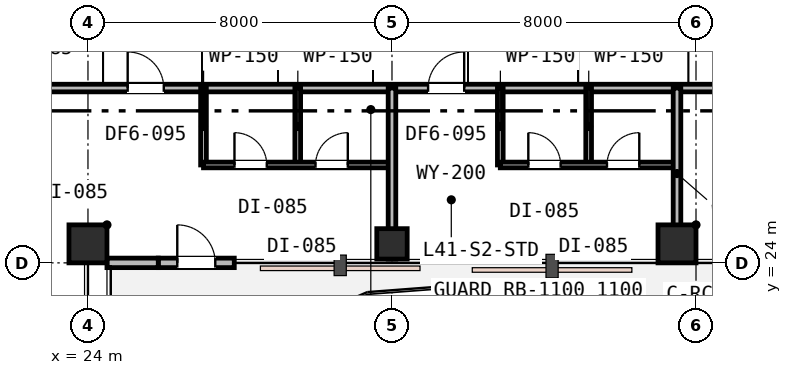
"""IFC4 building model, lengths in metres.
Left out: names, types, materials, properties, quantities, classifications, styles, units other than length and angle.
Written with IfcOpenShell. Run it as: python <this file> out.ifc"""

import sys

from ifc_helpers import new_model, si_unit, direction, frame, frame_2d, origin, origin_2d, place, context, subcontext, project, spatial, rectangle, extrude, element, fill, save


model = new_model("IFC4")
c1 = context("Model", 3, precision=1e-05, world=origin(), true_north=direction((0.0, 1.0)))
c2 = subcontext(c1, "Body", "Model", "MODEL_VIEW")
j1 = project(units=[si_unit("LENGTHUNIT", "METRE"), si_unit("PLANEANGLEUNIT", "RADIAN")], contexts=[c1])
p1 = place(None, origin())
s1 = spatial("IfcSite", under=j1, at=p1, CompositionType="ELEMENT")
p2 = place(p1, origin())
s2 = spatial("IfcBuilding", under=s1, at=p2, CompositionType="ELEMENT")
p3 = place(p2, frame((0.0, 0.0, 161.4)))
s3 = spatial("IfcBuildingStorey", under=s2, at=p3, CompositionType="ELEMENT", Elevation=161.4)
p4 = place(p3, frame((24.0, 24.5, 0.0), z_axis=(0.0, 0.0, 1.0), x_axis=(1.0, 0.0, 0.0)))
e1 = element("IfcColumn", 1, at=p4, inside=s3, PredefinedType="COLUMN", context=c2, shape_type="SweptSolid", body=[
    extrude(rectangle(XDim=1.0, YDim=1.0, at=origin_2d()), origin(), (0.0, 0.0, 1.0), 3.6),
])
p5 = place(p3, frame((32.0, 24.5, 0.0), z_axis=(0.0, 0.0, 1.0), x_axis=(1.0, 0.0, 0.0)))
e2 = element("IfcColumn", 2, at=p5, inside=s3, PredefinedType="COLUMN", context=c2, shape_type="SweptSolid", body=[
    extrude(rectangle(XDim=0.8, YDim=0.8, at=origin_2d()), origin(), (0.0, 0.0, 1.0), 3.6),
])
p6 = place(p3, frame((39.5, 24.5, 0.0), z_axis=(0.0, 0.0, 1.0), x_axis=(1.0, 0.0, 0.0)))
e3 = element("IfcColumn", 3, at=p6, inside=s3, PredefinedType="COLUMN", context=c2, shape_type="SweptSolid", body=[
    extrude(rectangle(XDim=1.0, YDim=1.0, at=origin_2d()), origin(), (0.0, 0.0, 1.0), 3.6),
])
p7 = place(p3, frame((25.85, 24.0, 0.0), z_axis=(0.0, 0.0, 1.0), x_axis=(1.0, 0.0, 0.0)))
e4 = element("IfcWall", 4, at=p7, inside=s3, PredefinedType="STANDARD", context=c2, shape_type="SweptSolid", body=[
    extrude(rectangle(XDim=2.0, YDim=0.25, at=frame_2d((1.0, 0.0))), origin(), (0.0, 0.0, 1.0), 3.01),
])
p8 = place(p7, frame((0.5, 0.0, 0.0)))
e5 = element("IfcOpeningElement", 5, at=p8, cuts=e4, PredefinedType="OPENING", context=c2, shape_type="SweptSolid", body=[
    extrude(rectangle(XDim=1.0, YDim=2.15, at=frame_2d((0.5, 1.075))), frame((0.0, 0.135, 0.0), z_axis=(0.0, -1.0, 0.0), x_axis=(1.0, 0.0, 0.0)), (0.0, 0.0, 1.0), 0.27),
])
p9 = place(p3, frame((24.5, 24.0, 0.0), z_axis=(0.0, 0.0, 1.0), x_axis=(1.0, 0.0, 0.0)))
e6 = element("IfcWall", 6, at=p9, inside=s3, PredefinedType="STANDARD", context=c2, shape_type="SweptSolid", body=[
    extrude(rectangle(XDim=1.35, YDim=0.25, at=frame_2d((0.675, 0.0))), origin(), (0.0, 0.0, 1.0), 3.01),
])
p10 = place(p3, frame((19.6, 28.6, 0.0), z_axis=(0.0, 0.0, 1.0), x_axis=(1.0, 0.0, 0.0)))
e7 = element("IfcWall", 7, at=p10, inside=s3, PredefinedType="PARTITIONING", context=c2, shape_type="SweptSolid", body=[
    extrude(rectangle(XDim=31.3, YDim=0.2, at=frame_2d((15.65, 0.0))), origin(), (0.0, 0.0, 1.0), 2.93),
])
p11 = place(p10, frame((5.445, 0.0, 0.0)))
e8 = element("IfcOpeningElement", 8, at=p11, cuts=e7, PredefinedType="OPENING", context=c2, shape_type="SweptSolid", body=[
    extrude(rectangle(XDim=0.95, YDim=2.15, at=frame_2d((0.475, 1.075))), frame((0.0, 0.11, 0.0), z_axis=(0.0, -1.0, 0.0), x_axis=(1.0, 0.0, 0.0)), (0.0, 0.0, 1.0), 0.22),
])
p12 = place(p10, frame((13.35, 0.0, 0.0)))
e9 = element("IfcOpeningElement", 9, at=p12, cuts=e7, PredefinedType="OPENING", context=c2, shape_type="SweptSolid", body=[
    extrude(rectangle(XDim=0.95, YDim=2.15, at=frame_2d((0.475, 1.075))), frame((0.0, 0.11, 0.0), z_axis=(0.0, -1.0, 0.0), x_axis=(1.0, 0.0, 0.0)), (0.0, 0.0, 1.0), 0.22),
])
p13 = place(p10, frame((21.925, 0.0, 0.0)))
e10 = element("IfcOpeningElement", 10, at=p13, cuts=e7, PredefinedType="OPENING", context=c2, shape_type="SweptSolid", body=[
    extrude(rectangle(XDim=0.95, YDim=2.15, at=frame_2d((0.475, 1.075))), frame((0.0, 0.11, 0.0), z_axis=(0.0, -1.0, 0.0), x_axis=(1.0, 0.0, 0.0)), (0.0, 0.0, 1.0), 0.22),
])
for number, where, z_axis, x_axis in (
    (11, (27.04, 26.576, 0.0), (0.0, 0.0, 1.0), (0.0, 1.0, 0.0)),
    (12, (29.52, 26.576, 0.0), (0.0, 0.0, 1.0), (0.0, 1.0, 0.0)),
):
    element("IfcWall", number, at=place(p3, frame(where, z_axis=z_axis, x_axis=x_axis)), inside=s3, PredefinedType="PARTITIONING", context=c2, shape_type="SweptSolid", body=[
        extrude(rectangle(XDim=2.024, YDim=0.15, at=frame_2d((1.012, 0.0))), origin(), (0.0, 0.0, 1.0), 2.96),
    ])
p14 = place(p3, frame((27.04, 26.576, 0.0), z_axis=(0.0, 0.0, 1.0), x_axis=(1.0, 0.0, 0.0)))
e13 = element("IfcWall", 13, at=p14, inside=s3, PredefinedType="PARTITIONING", context=c2, shape_type="SweptSolid", body=[
    extrude(rectangle(XDim=4.96, YDim=0.15, at=frame_2d((2.48, 0.0))), origin(), (0.0, 0.0, 1.0), 2.93),
])
p15 = place(p14, frame((0.815, 0.0, 0.0)))
e14 = element("IfcOpeningElement", 14, at=p15, cuts=e13, PredefinedType="OPENING", context=c2, shape_type="SweptSolid", body=[
    extrude(rectangle(XDim=0.85, YDim=2.15, at=frame_2d((0.425, 1.075))), frame((0.0, 0.085, 0.0), z_axis=(0.0, -1.0, 0.0), x_axis=(1.0, 0.0, 0.0)), (0.0, 0.0, 1.0), 0.17),
])
p16 = place(p14, frame((2.947, 0.0, 0.0)))
e15 = element("IfcOpeningElement", 15, at=p16, cuts=e13, PredefinedType="OPENING", context=c2, shape_type="SweptSolid", body=[
    extrude(rectangle(XDim=0.85, YDim=2.15, at=frame_2d((0.425, 1.075))), frame((0.0, 0.085, 0.0), z_axis=(0.0, -1.0, 0.0), x_axis=(1.0, 0.0, 0.0)), (0.0, 0.0, 1.0), 0.17),
])
p17 = place(p3, frame((32.0, 24.1, 0.0), z_axis=(0.0, 0.0, 1.0), x_axis=(0.0, 1.0, 0.0)))
e16 = element("IfcWall", 16, at=p17, inside=s3, PredefinedType="PARTITIONING", context=c2, shape_type="SweptSolid", body=[
    extrude(rectangle(XDim=4.5, YDim=0.2, at=frame_2d((2.25, 0.0))), origin(), (0.0, 0.0, 1.0), 2.93),
])
for number, where, z_axis, x_axis in (
    (17, (34.85, 26.576, 0.0), (0.0, 0.0, 1.0), (0.0, 1.0, 0.0)),
    (18, (37.175, 26.576, 0.0), (0.0, 0.0, 1.0), (0.0, 1.0, 0.0)),
):
    element("IfcWall", number, at=place(p3, frame(where, z_axis=z_axis, x_axis=x_axis)), inside=s3, PredefinedType="PARTITIONING", context=c2, shape_type="SweptSolid", body=[
        extrude(rectangle(XDim=2.024, YDim=0.15, at=frame_2d((1.012, 0.0))), origin(), (0.0, 0.0, 1.0), 2.96),
    ])
p18 = place(p3, frame((34.85, 26.576, 0.0), z_axis=(0.0, 0.0, 1.0), x_axis=(1.0, 0.0, 0.0)))
e19 = element("IfcWall", 19, at=p18, inside=s3, PredefinedType="PARTITIONING", context=c2, shape_type="SweptSolid", body=[
    extrude(rectangle(XDim=4.65, YDim=0.15, at=frame_2d((2.325, 0.0))), origin(), (0.0, 0.0, 1.0), 2.93),
])
p19 = place(p18, frame((0.738, 0.0, 0.0)))
e20 = element("IfcOpeningElement", 20, at=p19, cuts=e19, PredefinedType="OPENING", context=c2, shape_type="SweptSolid", body=[
    extrude(rectangle(XDim=0.85, YDim=2.15, at=frame_2d((0.425, 1.075))), frame((0.0, 0.085, 0.0), z_axis=(0.0, -1.0, 0.0), x_axis=(1.0, 0.0, 0.0)), (0.0, 0.0, 1.0), 0.17),
])
p20 = place(p18, frame((2.808, 0.0, 0.0)))
e21 = element("IfcOpeningElement", 21, at=p20, cuts=e19, PredefinedType="OPENING", context=c2, shape_type="SweptSolid", body=[
    extrude(rectangle(XDim=0.85, YDim=2.15, at=frame_2d((0.425, 1.075))), frame((0.0, 0.085, 0.0), z_axis=(0.0, -1.0, 0.0), x_axis=(1.0, 0.0, 0.0)), (0.0, 0.0, 1.0), 0.17),
])
p21 = place(p3, frame((39.5, 24.1, 0.0), z_axis=(0.0, 0.0, 1.0), x_axis=(0.0, 1.0, 0.0)))
e22 = element("IfcWall", 22, at=p21, inside=s3, PredefinedType="PARTITIONING", context=c2, shape_type="SweptSolid", body=[
    extrude(rectangle(XDim=4.5, YDim=0.2, at=frame_2d((2.25, 0.0))), origin(), (0.0, 0.0, 1.0), 2.93),
])
p22 = place(p8, origin())
e23 = element("IfcDoor", 23, at=p22, inside=s3, OperationType="SINGLE_SWING_LEFT", PredefinedType="DOOR", context=c2, shape_type="SweptSolid", body=[
    extrude(rectangle(XDim=1.0, YDim=2.15, at=frame_2d((0.5, 1.075))), frame((0.0, 0.025, 0.0), z_axis=(0.0, -1.0, 0.0), x_axis=(1.0, 0.0, 0.0)), (0.0, 0.0, 1.0), 0.05),
])
fill(e5, e23)
p23 = place(p11, origin())
e24 = element("IfcDoor", 24, at=p23, inside=s3, OperationType="SINGLE_SWING_LEFT", PredefinedType="DOOR", context=c2, shape_type="SweptSolid", body=[
    extrude(rectangle(XDim=0.95, YDim=2.15, at=frame_2d((0.475, 1.075))), frame((0.0, 0.025, 0.0), z_axis=(0.0, -1.0, 0.0), x_axis=(1.0, 0.0, 0.0)), (0.0, 0.0, 1.0), 0.05),
])
fill(e8, e24)
p24 = place(p15, origin())
e25 = element("IfcDoor", 25, at=p24, inside=s3, OperationType="SINGLE_SWING_LEFT", PredefinedType="DOOR", context=c2, shape_type="SweptSolid", body=[
    extrude(rectangle(XDim=0.85, YDim=2.15, at=frame_2d((0.425, 1.075))), frame((0.0, 0.025, 0.0), z_axis=(0.0, -1.0, 0.0), x_axis=(1.0, 0.0, 0.0)), (0.0, 0.0, 1.0), 0.05),
])
fill(e14, e25)
p25 = place(p16, origin())
e26 = element("IfcDoor", 26, at=p25, inside=s3, OperationType="SINGLE_SWING_RIGHT", PredefinedType="DOOR", context=c2, shape_type="SweptSolid", body=[
    extrude(rectangle(XDim=0.85, YDim=2.15, at=frame_2d((0.425, 1.075))), frame((0.0, 0.025, 0.0), z_axis=(0.0, -1.0, 0.0), x_axis=(1.0, 0.0, 0.0)), (0.0, 0.0, 1.0), 0.05),
])
fill(e15, e26)
p26 = place(p12, origin())
e27 = element("IfcDoor", 27, at=p26, inside=s3, OperationType="SINGLE_SWING_RIGHT", PredefinedType="DOOR", context=c2, shape_type="SweptSolid", body=[
    extrude(rectangle(XDim=0.95, YDim=2.15, at=frame_2d((0.475, 1.075))), frame((0.0, 0.025, 0.0), z_axis=(0.0, -1.0, 0.0), x_axis=(1.0, 0.0, 0.0)), (0.0, 0.0, 1.0), 0.05),
])
fill(e9, e27)
p27 = place(p19, origin())
e28 = element("IfcDoor", 28, at=p27, inside=s3, OperationType="SINGLE_SWING_LEFT", PredefinedType="DOOR", context=c2, shape_type="SweptSolid", body=[
    extrude(rectangle(XDim=0.85, YDim=2.15, at=frame_2d((0.425, 1.075))), frame((0.0, 0.025, 0.0), z_axis=(0.0, -1.0, 0.0), x_axis=(1.0, 0.0, 0.0)), (0.0, 0.0, 1.0), 0.05),
])
fill(e20, e28)
p28 = place(p20, origin())
e29 = element("IfcDoor", 29, at=p28, inside=s3, OperationType="SINGLE_SWING_RIGHT", PredefinedType="DOOR", context=c2, shape_type="SweptSolid", body=[
    extrude(rectangle(XDim=0.85, YDim=2.15, at=frame_2d((0.425, 1.075))), frame((0.0, 0.025, 0.0), z_axis=(0.0, -1.0, 0.0), x_axis=(1.0, 0.0, 0.0)), (0.0, 0.0, 1.0), 0.05),
])
fill(e21, e29)
save(model, sys.argv[1])
